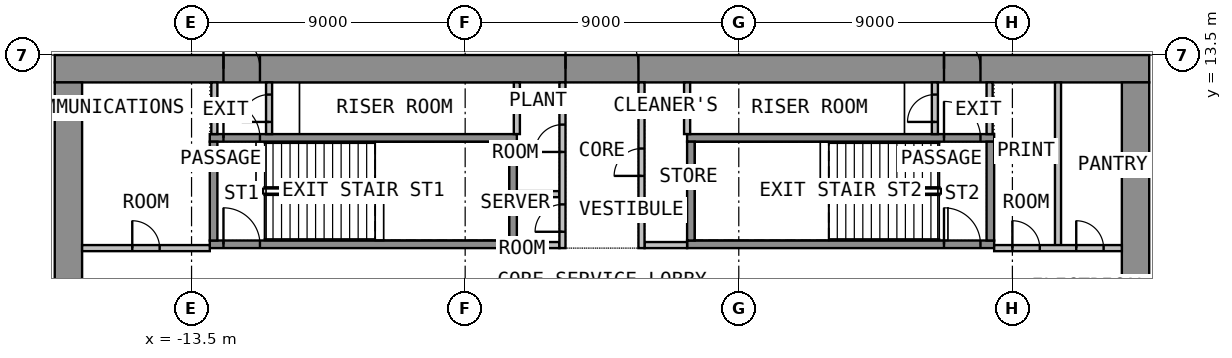
"""IFC4 building model, lengths in metres.
Left out: names, types, materials, properties, quantities, classifications, styles, units other than length and angle.
Written with IfcOpenShell. Run it as: python <this file> out.ifc"""

import sys

from ifc_helpers import new_model, si_unit, direction, frame, frame_2d, origin, place, context, subcontext, project, spatial, rectangle, extrude, element, fill, save


model = new_model("IFC4")
c1 = context("Model", 3, precision=1e-05, world=origin(), true_north=direction((0.0, 1.0)))
c2 = subcontext(c1, "Body", "Model", "MODEL_VIEW")
j1 = project(units=[si_unit("LENGTHUNIT", "METRE"), si_unit("PLANEANGLEUNIT", "RADIAN")], contexts=[c1])
p1 = place(None, origin())
s1 = spatial("IfcSite", under=j1, at=p1, CompositionType="ELEMENT")
p2 = place(p1, origin())
s2 = spatial("IfcBuilding", under=s1, at=p2, CompositionType="ELEMENT")
p3 = place(p2, frame((0.0, 0.0, 6.0)))
s3 = spatial("IfcBuildingStorey", under=s2, at=p3, CompositionType="ELEMENT", Elevation=6.0)
p4 = place(p3, frame((-18.0, 13.05, 0.0), z_axis=(0.0, 0.0, 1.0), x_axis=(1.0, 0.0, 0.0)))
e1 = element("IfcWall", 1, at=p4, inside=s3, PredefinedType="SHEAR", context=c2, shape_type="SweptSolid", body=[
    extrude(rectangle(XDim=36.0, YDim=0.9, at=frame_2d((18.0, 0.0))), origin(), (0.0, 0.0, 1.0), 4.4),
])
p5 = place(p4, frame((16.8, 0.0, 0.0)))
e2 = element("IfcOpeningElement", 2, at=p5, cuts=e1, PredefinedType="OPENING", context=c2, shape_type="SweptSolid", body=[
    extrude(rectangle(XDim=2.4, YDim=2.1, at=frame_2d((1.2, 1.05))), frame((0.0, 0.46, 0.0), z_axis=(0.0, -1.0, 0.0), x_axis=(1.0, 0.0, 0.0)), (0.0, 0.0, 1.0), 0.92),
])
p6 = place(p4, frame((5.55, 0.0, 0.0)))
e3 = element("IfcOpeningElement", 3, at=p6, cuts=e1, PredefinedType="OPENING", context=c2, shape_type="SweptSolid", body=[
    extrude(rectangle(XDim=1.2, YDim=2.1, at=frame_2d((0.6, 1.05))), frame((0.0, 0.46, 0.0), z_axis=(0.0, -1.0, 0.0), x_axis=(1.0, 0.0, 0.0)), (0.0, 0.0, 1.0), 0.92),
])
p7 = place(p4, frame((29.25, 0.0, 0.0)))
e4 = element("IfcOpeningElement", 4, at=p7, cuts=e1, PredefinedType="OPENING", context=c2, shape_type="SweptSolid", body=[
    extrude(rectangle(XDim=1.2, YDim=2.1, at=frame_2d((0.6, 1.05))), frame((0.0, 0.46, 0.0), z_axis=(0.0, -1.0, 0.0), x_axis=(1.0, 0.0, 0.0)), (0.0, 0.0, 1.0), 0.92),
])
p8 = place(p3, frame((-17.55, -12.6, 0.0), z_axis=(0.0, 0.0, 1.0), x_axis=(0.0, 1.0, 0.0)))
e5 = element("IfcWall", 5, at=p8, inside=s3, PredefinedType="SHEAR", context=c2, shape_type="SweptSolid", body=[
    extrude(rectangle(XDim=25.2, YDim=0.9, at=frame_2d((12.6, 0.0))), origin(), (0.0, 0.0, 1.0), 4.4),
])
p9 = place(p8, frame((11.4, 0.0, 0.0)))
e6 = element("IfcOpeningElement", 6, at=p9, cuts=e5, PredefinedType="OPENING", context=c2, shape_type="SweptSolid", body=[
    extrude(rectangle(XDim=2.4, YDim=2.1, at=frame_2d((1.2, 1.05))), frame((0.0, 0.46, 0.0), z_axis=(0.0, -1.0, 0.0), x_axis=(1.0, 0.0, 0.0)), (0.0, 0.0, 1.0), 0.92),
])
p10 = place(p3, frame((17.55, -12.6, 0.0), z_axis=(0.0, 0.0, 1.0), x_axis=(0.0, 1.0, 0.0)))
e7 = element("IfcWall", 7, at=p10, inside=s3, PredefinedType="SHEAR", context=c2, shape_type="SweptSolid", body=[
    extrude(rectangle(XDim=25.2, YDim=0.9, at=frame_2d((12.6, 0.0))), origin(), (0.0, 0.0, 1.0), 4.4),
])
p11 = place(p10, frame((11.4, 0.0, 0.0)))
e8 = element("IfcOpeningElement", 8, at=p11, cuts=e7, PredefinedType="OPENING", context=c2, shape_type="SweptSolid", body=[
    extrude(rectangle(XDim=2.4, YDim=2.1, at=frame_2d((1.2, 1.05))), frame((0.0, 0.46, 0.0), z_axis=(0.0, -1.0, 0.0), x_axis=(1.0, 0.0, 0.0)), (0.0, 0.0, 1.0), 0.92),
])
p12 = place(p3, frame((-12.9, 7.275, 0.0), z_axis=(0.0, 0.0, 1.0), x_axis=(1.0, 0.0, 0.0)))
e9 = element("IfcWall", 9, at=p12, inside=s3, PredefinedType="SHEAR", context=c2, shape_type="SweptSolid", body=[
    extrude(rectangle(XDim=10.1, YDim=0.25, at=frame_2d((5.05, 0.0))), origin(), (0.0, 0.0, 1.0), 4.4),
])
p13 = place(p12, frame((0.45, 0.0, 0.0)))
e10 = element("IfcOpeningElement", 10, at=p13, cuts=e9, PredefinedType="OPENING", context=c2, shape_type="SweptSolid", body=[
    extrude(rectangle(XDim=1.2, YDim=2.1, at=frame_2d((0.6, 1.05))), frame((0.0, 0.135, 0.0), z_axis=(0.0, -1.0, 0.0), x_axis=(1.0, 0.0, 0.0)), (0.0, 0.0, 1.0), 0.27),
])
p14 = place(p3, frame((-12.9, 10.775, 0.0), z_axis=(0.0, 0.0, 1.0), x_axis=(1.0, 0.0, 0.0)))
e11 = element("IfcWall", 11, at=p14, inside=s3, PredefinedType="SHEAR", context=c2, shape_type="SweptSolid", body=[
    extrude(rectangle(XDim=10.1, YDim=0.25, at=frame_2d((5.05, 0.0))), origin(), (0.0, 0.0, 1.0), 4.4),
])
p15 = place(p14, frame((0.45, 0.0, 0.0)))
e12 = element("IfcOpeningElement", 12, at=p15, cuts=e11, PredefinedType="OPENING", context=c2, shape_type="SweptSolid", body=[
    extrude(rectangle(XDim=1.2, YDim=2.1, at=frame_2d((0.6, 1.05))), frame((0.0, 0.135, 0.0), z_axis=(0.0, -1.0, 0.0), x_axis=(1.0, 0.0, 0.0)), (0.0, 0.0, 1.0), 0.27),
])
for number, where, z_axis, x_axis in (
    (13, (-12.775, 7.4, 0.0), (0.0, 0.0, 1.0), (0.0, 1.0, 0.0)),
    (14, (-2.925, 7.4, 0.0), (0.0, 0.0, 1.0), (0.0, 1.0, 0.0)),
):
    element("IfcWall", number, at=place(p3, frame(where, z_axis=z_axis, x_axis=x_axis)), inside=s3, PredefinedType="SHEAR", context=c2, shape_type="SweptSolid", body=[
        extrude(rectangle(XDim=3.25, YDim=0.25, at=frame_2d((1.625, 0.0))), origin(), (0.0, 0.0, 1.0), 4.4),
    ])
p16 = place(p3, frame((2.8, 7.275, 0.0), z_axis=(0.0, 0.0, 1.0), x_axis=(1.0, 0.0, 0.0)))
e15 = element("IfcWall", 15, at=p16, inside=s3, PredefinedType="SHEAR", context=c2, shape_type="SweptSolid", body=[
    extrude(rectangle(XDim=10.1, YDim=0.25, at=frame_2d((5.05, 0.0))), origin(), (0.0, 0.0, 1.0), 4.4),
])
p17 = place(p16, frame((8.45, 0.0, 0.0)))
e16 = element("IfcOpeningElement", 16, at=p17, cuts=e15, PredefinedType="OPENING", context=c2, shape_type="SweptSolid", body=[
    extrude(rectangle(XDim=1.2, YDim=2.1, at=frame_2d((0.6, 1.05))), frame((0.0, 0.135, 0.0), z_axis=(0.0, -1.0, 0.0), x_axis=(1.0, 0.0, 0.0)), (0.0, 0.0, 1.0), 0.27),
])
p18 = place(p3, frame((2.8, 10.775, 0.0), z_axis=(0.0, 0.0, 1.0), x_axis=(1.0, 0.0, 0.0)))
e17 = element("IfcWall", 17, at=p18, inside=s3, PredefinedType="SHEAR", context=c2, shape_type="SweptSolid", body=[
    extrude(rectangle(XDim=10.1, YDim=0.25, at=frame_2d((5.05, 0.0))), origin(), (0.0, 0.0, 1.0), 4.4),
])
p19 = place(p18, frame((8.45, 0.0, 0.0)))
e18 = element("IfcOpeningElement", 18, at=p19, cuts=e17, PredefinedType="OPENING", context=c2, shape_type="SweptSolid", body=[
    extrude(rectangle(XDim=1.2, YDim=2.1, at=frame_2d((0.6, 1.05))), frame((0.0, 0.135, 0.0), z_axis=(0.0, -1.0, 0.0), x_axis=(1.0, 0.0, 0.0)), (0.0, 0.0, 1.0), 0.27),
])
for number, where, z_axis, x_axis in (
    (19, (2.925, 7.4, 0.0), (0.0, 0.0, 1.0), (0.0, 1.0, 0.0)),
    (20, (12.775, 7.4, 0.0), (0.0, 0.0, 1.0), (0.0, 1.0, 0.0)),
):
    element("IfcWall", number, at=place(p3, frame(where, z_axis=z_axis, x_axis=x_axis)), inside=s3, PredefinedType="SHEAR", context=c2, shape_type="SweptSolid", body=[
        extrude(rectangle(XDim=3.25, YDim=0.25, at=frame_2d((1.625, 0.0))), origin(), (0.0, 0.0, 1.0), 4.4),
    ])
for number, where, z_axis, x_axis in (
    (21, (-2.8, 7.25, 0.0), (0.0, 0.0, 1.0), (1.0, 0.0, 0.0)),
    (22, (-2.8, 8.925, 0.0), (0.0, 0.0, 1.0), (1.0, 0.0, 0.0)),
    (23, (1.4, 7.25, 0.0), (0.0, 0.0, 1.0), (1.0, 0.0, 0.0)),
):
    element("IfcWall", number, at=place(p3, frame(where, z_axis=z_axis, x_axis=x_axis)), inside=s3, PredefinedType="PARTITIONING", context=c2, shape_type="SweptSolid", body=[
        extrude(rectangle(XDim=1.4, YDim=0.2, at=frame_2d((0.7, 0.0))), origin(), (0.0, 0.0, 1.0), 4.4),
    ])
p20 = place(p3, frame((-1.3, 7.15, 0.0), z_axis=(0.0, 0.0, 1.0), x_axis=(0.0, 1.0, 0.0)))
e24 = element("IfcWall", 24, at=p20, inside=s3, PredefinedType="PARTITIONING", context=c2, shape_type="SweptSolid", body=[
    extrude(rectangle(XDim=5.45, YDim=0.2, at=frame_2d((2.725, 0.0))), origin(), (0.0, 0.0, 1.0), 4.4),
])
p21 = place(p20, frame((0.538, 0.0, 0.0)))
e25 = element("IfcOpeningElement", 25, at=p21, cuts=e24, PredefinedType="OPENING", context=c2, shape_type="SweptSolid", body=[
    extrude(rectangle(XDim=0.9, YDim=2.1, at=frame_2d((0.45, 1.05))), frame((0.0, 0.11, 0.0), z_axis=(0.0, -1.0, 0.0), x_axis=(1.0, 0.0, 0.0)), (0.0, 0.0, 1.0), 0.22),
])
p22 = place(p20, frame((3.163, 0.0, 0.0)))
e26 = element("IfcOpeningElement", 26, at=p22, cuts=e24, PredefinedType="OPENING", context=c2, shape_type="SweptSolid", body=[
    extrude(rectangle(XDim=0.9, YDim=2.1, at=frame_2d((0.45, 1.05))), frame((0.0, 0.11, 0.0), z_axis=(0.0, -1.0, 0.0), x_axis=(1.0, 0.0, 0.0)), (0.0, 0.0, 1.0), 0.22),
])
p23 = place(p3, frame((1.3, 7.15, 0.0), z_axis=(0.0, 0.0, 1.0), x_axis=(0.0, 1.0, 0.0)))
e27 = element("IfcWall", 27, at=p23, inside=s3, PredefinedType="PARTITIONING", context=c2, shape_type="SweptSolid", body=[
    extrude(rectangle(XDim=5.45, YDim=0.2, at=frame_2d((2.725, 0.0))), origin(), (0.0, 0.0, 1.0), 4.4),
])
p24 = place(p23, frame((2.375, 0.0, 0.0)))
e28 = element("IfcOpeningElement", 28, at=p24, cuts=e27, PredefinedType="OPENING", context=c2, shape_type="SweptSolid", body=[
    extrude(rectangle(XDim=0.9, YDim=2.1, at=frame_2d((0.45, 1.05))), frame((0.0, 0.11, 0.0), z_axis=(0.0, -1.0, 0.0), x_axis=(1.0, 0.0, 0.0)), (0.0, 0.0, 1.0), 0.22),
])
p25 = place(p3, frame((-12.75, 10.9, 0.0), z_axis=(0.0, 0.0, 1.0), x_axis=(0.0, 1.0, 0.0)))
e29 = element("IfcWall", 29, at=p25, inside=s3, PredefinedType="PARTITIONING", context=c2, shape_type="SweptSolid", body=[
    extrude(rectangle(XDim=1.7, YDim=0.2, at=frame_2d((0.85, 0.0))), origin(), (0.0, 0.0, 1.0), 4.4),
])
p26 = place(p3, frame((-10.95, 10.9, 0.0), z_axis=(0.0, 0.0, 1.0), x_axis=(0.0, 1.0, 0.0)))
e30 = element("IfcWall", 30, at=p26, inside=s3, PredefinedType="PARTITIONING", context=c2, shape_type="SweptSolid", body=[
    extrude(rectangle(XDim=1.7, YDim=0.2, at=frame_2d((0.85, 0.0))), origin(), (0.0, 0.0, 1.0), 4.4),
])
p27 = place(p26, frame((0.4, 0.0, 0.0)))
e31 = element("IfcOpeningElement", 31, at=p27, cuts=e30, PredefinedType="OPENING", context=c2, shape_type="SweptSolid", body=[
    extrude(rectangle(XDim=0.9, YDim=2.1, at=frame_2d((0.45, 1.05))), frame((0.0, 0.11, 0.0), z_axis=(0.0, -1.0, 0.0), x_axis=(1.0, 0.0, 0.0)), (0.0, 0.0, 1.0), 0.22),
])
p28 = place(p3, frame((12.75, 10.9, 0.0), z_axis=(0.0, 0.0, 1.0), x_axis=(0.0, 1.0, 0.0)))
e32 = element("IfcWall", 32, at=p28, inside=s3, PredefinedType="PARTITIONING", context=c2, shape_type="SweptSolid", body=[
    extrude(rectangle(XDim=1.7, YDim=0.2, at=frame_2d((0.85, 0.0))), origin(), (0.0, 0.0, 1.0), 4.4),
])
p29 = place(p3, frame((10.95, 10.9, 0.0), z_axis=(0.0, 0.0, 1.0), x_axis=(0.0, 1.0, 0.0)))
e33 = element("IfcWall", 33, at=p29, inside=s3, PredefinedType="PARTITIONING", context=c2, shape_type="SweptSolid", body=[
    extrude(rectangle(XDim=1.7, YDim=0.2, at=frame_2d((0.85, 0.0))), origin(), (0.0, 0.0, 1.0), 4.4),
])
p30 = place(p29, frame((0.4, 0.0, 0.0)))
e34 = element("IfcOpeningElement", 34, at=p30, cuts=e33, PredefinedType="OPENING", context=c2, shape_type="SweptSolid", body=[
    extrude(rectangle(XDim=0.9, YDim=2.1, at=frame_2d((0.45, 1.05))), frame((0.0, 0.11, 0.0), z_axis=(0.0, -1.0, 0.0), x_axis=(1.0, 0.0, 0.0)), (0.0, 0.0, 1.0), 0.22),
])
p31 = place(p3, frame((-17.1, 7.15, 0.0), z_axis=(0.0, 0.0, 1.0), x_axis=(1.0, 0.0, 0.0)))
e35 = element("IfcWall", 35, at=p31, inside=s3, PredefinedType="PARTITIONING", context=c2, shape_type="SweptSolid", body=[
    extrude(rectangle(XDim=4.2, YDim=0.2, at=frame_2d((2.1, 0.0))), origin(), (0.0, 0.0, 1.0), 4.4),
])
p32 = place(p31, frame((1.65, 0.0, 0.0)))
e36 = element("IfcOpeningElement", 36, at=p32, cuts=e35, PredefinedType="OPENING", context=c2, shape_type="SweptSolid", body=[
    extrude(rectangle(XDim=0.9, YDim=2.1, at=frame_2d((0.45, 1.05))), frame((0.0, 0.11, 0.0), z_axis=(0.0, -1.0, 0.0), x_axis=(1.0, 0.0, 0.0)), (0.0, 0.0, 1.0), 0.22),
])
p33 = place(p3, frame((15.0, 7.15, 0.0), z_axis=(0.0, 0.0, 1.0), x_axis=(0.0, 1.0, 0.0)))
e37 = element("IfcWall", 37, at=p33, inside=s3, PredefinedType="PARTITIONING", context=c2, shape_type="SweptSolid", body=[
    extrude(rectangle(XDim=5.45, YDim=0.2, at=frame_2d((2.725, 0.0))), origin(), (0.0, 0.0, 1.0), 4.4),
])
p34 = place(p3, frame((12.9, 7.15, 0.0), z_axis=(0.0, 0.0, 1.0), x_axis=(1.0, 0.0, 0.0)))
e38 = element("IfcWall", 38, at=p34, inside=s3, PredefinedType="PARTITIONING", context=c2, shape_type="SweptSolid", body=[
    extrude(rectangle(XDim=4.2, YDim=0.2, at=frame_2d((2.1, 0.0))), origin(), (0.0, 0.0, 1.0), 4.4),
])
p35 = place(p34, frame((0.6, 0.0, 0.0)))
e39 = element("IfcOpeningElement", 39, at=p35, cuts=e38, PredefinedType="OPENING", context=c2, shape_type="SweptSolid", body=[
    extrude(rectangle(XDim=0.9, YDim=2.1, at=frame_2d((0.45, 1.05))), frame((0.0, 0.11, 0.0), z_axis=(0.0, -1.0, 0.0), x_axis=(1.0, 0.0, 0.0)), (0.0, 0.0, 1.0), 0.22),
])
p36 = place(p34, frame((2.7, 0.0, 0.0)))
e40 = element("IfcOpeningElement", 40, at=p36, cuts=e38, PredefinedType="OPENING", context=c2, shape_type="SweptSolid", body=[
    extrude(rectangle(XDim=0.9, YDim=2.1, at=frame_2d((0.45, 1.05))), frame((0.0, 0.11, 0.0), z_axis=(0.0, -1.0, 0.0), x_axis=(1.0, 0.0, 0.0)), (0.0, 0.0, 1.0), 0.22),
])
for number, where, z_axis, x_axis in (
    (41, (-2.8, 10.901, 0.0), (0.0, 0.0, 1.0), (0.0, 1.0, 0.0)),
    (42, (2.8, 12.599, 0.0), (0.0, 0.0, 1.0), (0.0, -1.0, 0.0)),
):
    element("IfcWall", number, at=place(p3, frame(where, z_axis=z_axis, x_axis=x_axis)), inside=s3, PredefinedType="PARTITIONING", context=c2, shape_type="SweptSolid", body=[
        extrude(rectangle(XDim=1.698, YDim=0.2, at=frame_2d((0.849, 0.0))), origin(), (0.0, 0.0, 1.0), 4.4),
    ])
p37 = place(p5, origin())
e43 = element("IfcDoor", 43, at=p37, inside=s3, OperationType="DOUBLE_DOOR_DOUBLE_SWING", PredefinedType="DOOR", context=c2, shape_type="SweptSolid", body=[
    extrude(rectangle(XDim=2.4, YDim=2.1, at=frame_2d((1.2, 1.05))), frame((0.0, 0.025, 0.0), z_axis=(0.0, -1.0, 0.0), x_axis=(1.0, 0.0, 0.0)), (0.0, 0.0, 1.0), 0.05),
])
fill(e2, e43)
p38 = place(p6, origin())
e44 = element("IfcDoor", 44, at=p38, inside=s3, OperationType="SINGLE_SWING_RIGHT", PredefinedType="DOOR", context=c2, shape_type="SweptSolid", body=[
    extrude(rectangle(XDim=1.2, YDim=2.1, at=frame_2d((0.6, 1.05))), frame((0.0, 0.025, 0.0), z_axis=(0.0, -1.0, 0.0), x_axis=(1.0, 0.0, 0.0)), (0.0, 0.0, 1.0), 0.05),
])
fill(e3, e44)
p39 = place(p7, origin())
e45 = element("IfcDoor", 45, at=p39, inside=s3, OperationType="SINGLE_SWING_RIGHT", PredefinedType="DOOR", context=c2, shape_type="SweptSolid", body=[
    extrude(rectangle(XDim=1.2, YDim=2.1, at=frame_2d((0.6, 1.05))), frame((0.0, 0.025, 0.0), z_axis=(0.0, -1.0, 0.0), x_axis=(1.0, 0.0, 0.0)), (0.0, 0.0, 1.0), 0.05),
])
fill(e4, e45)
p40 = place(p13, origin())
e46 = element("IfcDoor", 46, at=p40, inside=s3, OperationType="SINGLE_SWING_LEFT", PredefinedType="DOOR", context=c2, shape_type="SweptSolid", body=[
    extrude(rectangle(XDim=1.2, YDim=2.1, at=frame_2d((0.6, 1.05))), frame((0.0, 0.025, 0.0), z_axis=(0.0, -1.0, 0.0), x_axis=(1.0, 0.0, 0.0)), (0.0, 0.0, 1.0), 0.05),
])
fill(e10, e46)
p41 = place(p17, origin())
e47 = element("IfcDoor", 47, at=p41, inside=s3, OperationType="SINGLE_SWING_LEFT", PredefinedType="DOOR", context=c2, shape_type="SweptSolid", body=[
    extrude(rectangle(XDim=1.2, YDim=2.1, at=frame_2d((0.6, 1.05))), frame((0.0, 0.025, 0.0), z_axis=(0.0, -1.0, 0.0), x_axis=(1.0, 0.0, 0.0)), (0.0, 0.0, 1.0), 0.05),
])
fill(e16, e47)
p42 = place(p21, origin())
e48 = element("IfcDoor", 48, at=p42, inside=s3, OperationType="SINGLE_SWING_LEFT", PredefinedType="DOOR", context=c2, shape_type="SweptSolid", body=[
    extrude(rectangle(XDim=0.9, YDim=2.1, at=frame_2d((0.45, 1.05))), frame((0.0, 0.025, 0.0), z_axis=(0.0, -1.0, 0.0), x_axis=(1.0, 0.0, 0.0)), (0.0, 0.0, 1.0), 0.05),
])
fill(e25, e48)
p43 = place(p22, origin())
e49 = element("IfcDoor", 49, at=p43, inside=s3, OperationType="SINGLE_SWING_LEFT", PredefinedType="DOOR", context=c2, shape_type="SweptSolid", body=[
    extrude(rectangle(XDim=0.9, YDim=2.1, at=frame_2d((0.45, 1.05))), frame((0.0, 0.025, 0.0), z_axis=(0.0, -1.0, 0.0), x_axis=(1.0, 0.0, 0.0)), (0.0, 0.0, 1.0), 0.05),
])
fill(e26, e49)
p44 = place(p24, origin())
e50 = element("IfcDoor", 50, at=p44, inside=s3, OperationType="SINGLE_SWING_LEFT", PredefinedType="DOOR", context=c2, shape_type="SweptSolid", body=[
    extrude(rectangle(XDim=0.9, YDim=2.1, at=frame_2d((0.45, 1.05))), frame((0.0, 0.025, 0.0), z_axis=(0.0, -1.0, 0.0), x_axis=(1.0, 0.0, 0.0)), (0.0, 0.0, 1.0), 0.05),
])
fill(e28, e50)
p45 = place(p15, origin())
e51 = element("IfcDoor", 51, at=p45, inside=s3, OperationType="SINGLE_SWING_RIGHT", PredefinedType="DOOR", context=c2, shape_type="SweptSolid", body=[
    extrude(rectangle(XDim=1.2, YDim=2.1, at=frame_2d((0.6, 1.05))), frame((0.0, 0.025, 0.0), z_axis=(0.0, -1.0, 0.0), x_axis=(1.0, 0.0, 0.0)), (0.0, 0.0, 1.0), 0.05),
])
fill(e12, e51)
p46 = place(p27, origin())
e52 = element("IfcDoor", 52, at=p46, inside=s3, OperationType="SINGLE_SWING_LEFT", PredefinedType="DOOR", context=c2, shape_type="SweptSolid", body=[
    extrude(rectangle(XDim=0.9, YDim=2.1, at=frame_2d((0.45, 1.05))), frame((0.0, 0.025, 0.0), z_axis=(0.0, -1.0, 0.0), x_axis=(1.0, 0.0, 0.0)), (0.0, 0.0, 1.0), 0.05),
])
fill(e31, e52)
p47 = place(p19, origin())
e53 = element("IfcDoor", 53, at=p47, inside=s3, OperationType="SINGLE_SWING_RIGHT", PredefinedType="DOOR", context=c2, shape_type="SweptSolid", body=[
    extrude(rectangle(XDim=1.2, YDim=2.1, at=frame_2d((0.6, 1.05))), frame((0.0, 0.025, 0.0), z_axis=(0.0, -1.0, 0.0), x_axis=(1.0, 0.0, 0.0)), (0.0, 0.0, 1.0), 0.05),
])
fill(e18, e53)
p48 = place(p30, origin())
e54 = element("IfcDoor", 54, at=p48, inside=s3, OperationType="SINGLE_SWING_LEFT", PredefinedType="DOOR", context=c2, shape_type="SweptSolid", body=[
    extrude(rectangle(XDim=0.9, YDim=2.1, at=frame_2d((0.45, 1.05))), frame((0.0, 0.025, 0.0), z_axis=(0.0, -1.0, 0.0), x_axis=(1.0, 0.0, 0.0)), (0.0, 0.0, 1.0), 0.05),
])
fill(e34, e54)
p49 = place(p32, origin())
e55 = element("IfcDoor", 55, at=p49, inside=s3, OperationType="SINGLE_SWING_LEFT", PredefinedType="DOOR", context=c2, shape_type="SweptSolid", body=[
    extrude(rectangle(XDim=0.9, YDim=2.1, at=frame_2d((0.45, 1.05))), frame((0.0, 0.025, 0.0), z_axis=(0.0, -1.0, 0.0), x_axis=(1.0, 0.0, 0.0)), (0.0, 0.0, 1.0), 0.05),
])
fill(e36, e55)
p50 = place(p35, origin())
e56 = element("IfcDoor", 56, at=p50, inside=s3, OperationType="SINGLE_SWING_LEFT", PredefinedType="DOOR", context=c2, shape_type="SweptSolid", body=[
    extrude(rectangle(XDim=0.9, YDim=2.1, at=frame_2d((0.45, 1.05))), frame((0.0, 0.025, 0.0), z_axis=(0.0, -1.0, 0.0), x_axis=(1.0, 0.0, 0.0)), (0.0, 0.0, 1.0), 0.05),
])
fill(e39, e56)
p51 = place(p36, origin())
e57 = element("IfcDoor", 57, at=p51, inside=s3, OperationType="SINGLE_SWING_LEFT", PredefinedType="DOOR", context=c2, shape_type="SweptSolid", body=[
    extrude(rectangle(XDim=0.9, YDim=2.1, at=frame_2d((0.45, 1.05))), frame((0.0, 0.025, 0.0), z_axis=(0.0, -1.0, 0.0), x_axis=(1.0, 0.0, 0.0)), (0.0, 0.0, 1.0), 0.05),
])
fill(e40, e57)
save(model, sys.argv[1])
